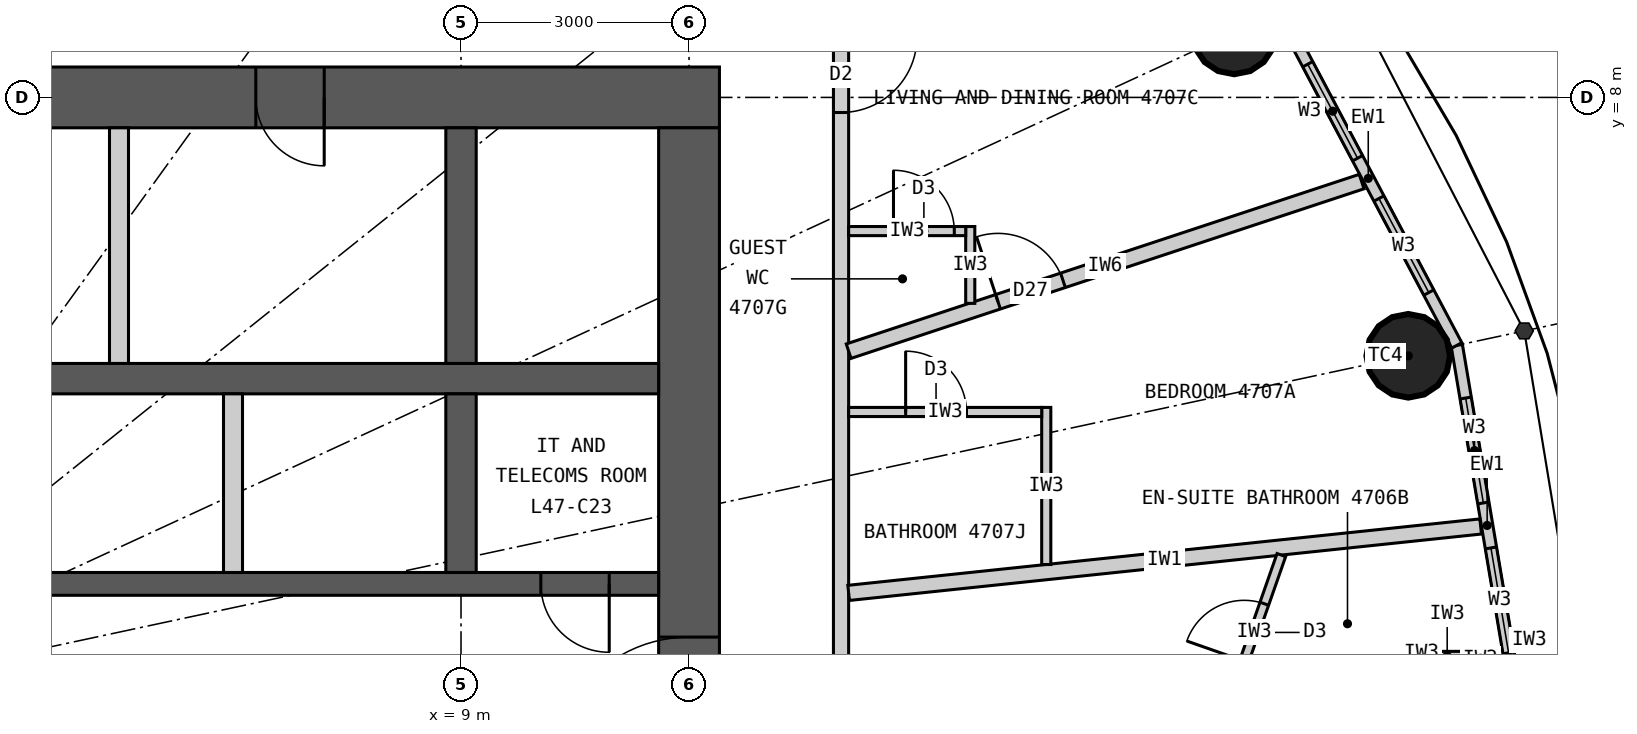
"""IFC4 building model, lengths in metres.
Left out: names, types, materials, properties, quantities, classifications, styles, units other than length and angle.
Written with IfcOpenShell. Run it as: python <this file> out.ifc"""

import sys

from ifc_helpers import new_model, si_unit, direction, frame, frame_2d, origin, origin_2d, place, context, subcontext, project, spatial, rectangle, circle, extrude, element, fill, save


model = new_model("IFC4")
c1 = context("Model", 3, precision=1e-05, world=origin(), true_north=direction((0.0, 1.0)))
c2 = subcontext(c1, "Body", "Model", "MODEL_VIEW")
j1 = project(units=[si_unit("LENGTHUNIT", "METRE"), si_unit("PLANEANGLEUNIT", "RADIAN")], contexts=[c1])
p1 = place(None, origin())
s1 = spatial("IfcSite", under=j1, at=p1, CompositionType="ELEMENT")
p2 = place(p1, origin())
s2 = spatial("IfcBuilding", under=s1, at=p2, CompositionType="ELEMENT")
p3 = place(p2, frame((0.0, 0.0, 176.4)))
s3 = spatial("IfcBuildingStorey", under=s2, at=p3, CompositionType="ELEMENT", Elevation=176.4)
for number, where, z_axis, x_axis in (
    (1, (21.463, 4.601, 0.0), (0.0, 0.0, 1.0), (1.0, 0.0, 0.0)),
    (2, (19.172, 8.855, 0.0), (0.0, 0.0, 1.0), (1.0, 0.0, 0.0)),
):
    element("IfcColumn", number, at=place(p3, frame(where, z_axis=z_axis, x_axis=x_axis)), inside=s3, PredefinedType="COLUMN", context=c2, shape_type="SweptSolid", body=[
        extrude(circle(Radius=0.55, at=origin_2d()), origin(), (0.0, 0.0, 1.0), 3.3),
    ])
p4 = place(p3, frame((-12.4, 8.0, 0.0), z_axis=(0.0, 0.0, 1.0), x_axis=(1.0, 0.0, 0.0)))
e3 = element("IfcWall", 3, at=p4, inside=s3, PredefinedType="SHEAR", context=c2, shape_type="SweptSolid", body=[
    extrude(rectangle(XDim=24.8, YDim=0.8, at=frame_2d((12.4, 0.0))), origin(), (0.0, 0.0, 1.0), 3.3),
])
p5 = place(p4, frame((11.1, 0.0, 0.0)))
e4 = element("IfcOpeningElement", 4, at=p5, cuts=e3, PredefinedType="OPENING", context=c2, shape_type="SweptSolid", body=[
    extrude(rectangle(XDim=1.2, YDim=2.2, at=frame_2d((0.6, 1.1))), frame((0.0, 0.41, 0.0), z_axis=(0.0, -1.0, 0.0), x_axis=(1.0, 0.0, 0.0)), (0.0, 0.0, 1.0), 0.82),
])
p6 = place(p4, frame((18.7, 0.0, 0.0)))
e5 = element("IfcOpeningElement", 5, at=p6, cuts=e3, PredefinedType="OPENING", context=c2, shape_type="SweptSolid", body=[
    extrude(rectangle(XDim=0.9, YDim=2.2, at=frame_2d((0.45, 1.1))), frame((0.0, 0.41, 0.0), z_axis=(0.0, -1.0, 0.0), x_axis=(1.0, 0.0, 0.0)), (0.0, 0.0, 1.0), 0.82),
])
p7 = place(p3, frame((12.0, -7.6, 0.0), z_axis=(0.0, 0.0, 1.0), x_axis=(0.0, 1.0, 0.0)))
e6 = element("IfcWall", 6, at=p7, inside=s3, PredefinedType="SHEAR", context=c2, shape_type="SweptSolid", body=[
    extrude(rectangle(XDim=15.2, YDim=0.8, at=frame_2d((7.6, 0.0))), origin(), (0.0, 0.0, 1.0), 3.3),
])
p8 = place(p7, frame((6.7, 0.0, 0.0)))
e7 = element("IfcOpeningElement", 7, at=p8, cuts=e6, PredefinedType="OPENING", context=c2, shape_type="SweptSolid", body=[
    extrude(rectangle(XDim=1.8, YDim=2.2, at=frame_2d((0.9, 1.1))), frame((0.0, 0.41, 0.0), z_axis=(0.0, -1.0, 0.0), x_axis=(1.0, 0.0, 0.0)), (0.0, 0.0, 1.0), 0.82),
])
p9 = place(p3, frame((-11.6, 4.3, 0.0), z_axis=(0.0, 0.0, 1.0), x_axis=(1.0, 0.0, 0.0)))
e8 = element("IfcWall", 8, at=p9, inside=s3, PredefinedType="SHEAR", context=c2, shape_type="SweptSolid", body=[
    extrude(rectangle(XDim=23.2, YDim=0.4, at=frame_2d((11.6, 0.0))), origin(), (0.0, 0.0, 1.0), 3.3),
])
p10 = place(p3, frame((-11.6, 1.6, 0.0), z_axis=(0.0, 0.0, 1.0), x_axis=(1.0, 0.0, 0.0)))
e9 = element("IfcWall", 9, at=p10, inside=s3, PredefinedType="SHEAR", context=c2, shape_type="SweptSolid", body=[
    extrude(rectangle(XDim=23.2, YDim=0.3, at=frame_2d((11.6, 0.0))), origin(), (0.0, 0.0, 1.0), 3.3),
])
p11 = place(p10, frame((9.55, 0.0, 0.0)))
e10 = element("IfcOpeningElement", 10, at=p11, cuts=e9, PredefinedType="OPENING", context=c2, shape_type="SweptSolid", body=[
    extrude(rectangle(XDim=1.1, YDim=2.2, at=frame_2d((0.55, 1.1))), frame((0.0, 0.16, 0.0), z_axis=(0.0, -1.0, 0.0), x_axis=(1.0, 0.0, 0.0)), (0.0, 0.0, 1.0), 0.32),
])
p12 = place(p10, frame((12.55, 0.0, 0.0)))
e11 = element("IfcOpeningElement", 11, at=p12, cuts=e9, PredefinedType="OPENING", context=c2, shape_type="SweptSolid", body=[
    extrude(rectangle(XDim=1.1, YDim=2.2, at=frame_2d((0.55, 1.1))), frame((0.0, 0.16, 0.0), z_axis=(0.0, -1.0, 0.0), x_axis=(1.0, 0.0, 0.0)), (0.0, 0.0, 1.0), 0.32),
])
p13 = place(p10, frame((0.65, 0.0, 0.0)))
e12 = element("IfcOpeningElement", 12, at=p13, cuts=e9, PredefinedType="OPENING", context=c2, shape_type="SweptSolid", body=[
    extrude(rectangle(XDim=0.9, YDim=2.2, at=frame_2d((0.45, 1.1))), frame((0.0, 0.16, 0.0), z_axis=(0.0, -1.0, 0.0), x_axis=(1.0, 0.0, 0.0)), (0.0, 0.0, 1.0), 0.32),
])
p14 = place(p10, frame((5.15, 0.0, 0.0)))
e13 = element("IfcOpeningElement", 13, at=p14, cuts=e9, PredefinedType="OPENING", context=c2, shape_type="SweptSolid", body=[
    extrude(rectangle(XDim=0.9, YDim=2.2, at=frame_2d((0.45, 1.1))), frame((0.0, 0.16, 0.0), z_axis=(0.0, -1.0, 0.0), x_axis=(1.0, 0.0, 0.0)), (0.0, 0.0, 1.0), 0.32),
])
p15 = place(p10, frame((21.65, 0.0, 0.0)))
e14 = element("IfcOpeningElement", 14, at=p15, cuts=e9, PredefinedType="OPENING", context=c2, shape_type="SweptSolid", body=[
    extrude(rectangle(XDim=0.9, YDim=2.2, at=frame_2d((0.45, 1.1))), frame((0.0, 0.16, 0.0), z_axis=(0.0, -1.0, 0.0), x_axis=(1.0, 0.0, 0.0)), (0.0, 0.0, 1.0), 0.32),
])
p16 = place(p3, frame((9.0, 4.5, 0.0), z_axis=(0.0, 0.0, 1.0), x_axis=(0.0, 1.0, 0.0)))
e15 = element("IfcWall", 15, at=p16, inside=s3, PredefinedType="SHEAR", context=c2, shape_type="SweptSolid", body=[
    extrude(rectangle(XDim=3.1, YDim=0.4, at=frame_2d((1.55, 0.0))), origin(), (0.0, 0.0, 1.0), 3.3),
])
p17 = place(p3, frame((9.0, 1.75, 0.0), z_axis=(0.0, 0.0, 1.0), x_axis=(0.0, 1.0, 0.0)))
e16 = element("IfcWall", 16, at=p17, inside=s3, PredefinedType="SHEAR", context=c2, shape_type="SweptSolid", body=[
    extrude(rectangle(XDim=2.35, YDim=0.4, at=frame_2d((1.175, 0.0))), origin(), (0.0, 0.0, 1.0), 3.3),
])
p18 = place(p3, frame((4.5, 4.5, 0.0), z_axis=(0.0, 0.0, 1.0), x_axis=(0.0, 1.0, 0.0)))
e17 = element("IfcWall", 17, at=p18, inside=s3, PredefinedType="PARTITIONING", context=c2, shape_type="SweptSolid", body=[
    extrude(rectangle(XDim=3.1, YDim=0.25, at=frame_2d((1.55, 0.0))), origin(), (0.0, 0.0, 1.0), 3.3),
])
p19 = place(p3, frame((6.0, 1.75, 0.0), z_axis=(0.0, 0.0, 1.0), x_axis=(0.0, 1.0, 0.0)))
e18 = element("IfcWall", 18, at=p19, inside=s3, PredefinedType="PARTITIONING", context=c2, shape_type="SweptSolid", body=[
    extrude(rectangle(XDim=2.35, YDim=0.25, at=frame_2d((1.175, 0.0))), origin(), (0.0, 0.0, 1.0), 3.3),
])
p20 = place(p3, frame((22.9, 0.0, 0.0), z_axis=(0.0, 0.0, 1.0), x_axis=(-0.166162111254, 0.986098449843, 0.0)))
e19 = element("IfcWall", 19, at=p20, inside=s3, PredefinedType="ELEMENTEDWALL", context=c2, shape_type="SweptSolid", body=[
    extrude(rectangle(XDim=4.805, YDim=0.15, at=frame_2d((2.402, 0.0))), origin(), (0.0, 0.0, 1.0), 3.12),
])
p21 = place(p20, frame((0.702, 0.0, 0.9)))
e20 = element("IfcOpeningElement", 20, at=p21, cuts=e19, PredefinedType="OPENING", context=c2, shape_type="SweptSolid", body=[
    extrude(rectangle(XDim=1.4, YDim=1.9, at=frame_2d((0.7, 0.95))), frame((0.0, 0.085, 0.0), z_axis=(0.0, -1.0, 0.0), x_axis=(1.0, 0.0, 0.0)), (0.0, 0.0, 1.0), 0.17),
])
p22 = place(p20, frame((2.702, 0.0, 0.9)))
e21 = element("IfcOpeningElement", 21, at=p22, cuts=e19, PredefinedType="OPENING", context=c2, shape_type="SweptSolid", body=[
    extrude(rectangle(XDim=1.4, YDim=1.9, at=frame_2d((0.7, 0.95))), frame((0.0, 0.085, 0.0), z_axis=(0.0, -1.0, 0.0), x_axis=(1.0, 0.0, 0.0)), (0.0, 0.0, 1.0), 0.17),
])
p23 = place(p3, frame((22.102, 4.738, 0.0), z_axis=(0.0, 0.0, 1.0), x_axis=(-0.468428906714, 0.883501193748, 0.0)))
e22 = element("IfcWall", 22, at=p23, inside=s3, PredefinedType="ELEMENTEDWALL", context=c2, shape_type="SweptSolid", body=[
    extrude(rectangle(XDim=4.974, YDim=0.15, at=frame_2d((2.487, 0.0))), origin(), (0.0, 0.0, 1.0), 3.12),
])
p24 = place(p23, frame((0.787, 0.0, 0.9)))
e23 = element("IfcOpeningElement", 23, at=p24, cuts=e22, PredefinedType="OPENING", context=c2, shape_type="SweptSolid", body=[
    extrude(rectangle(XDim=1.4, YDim=1.9, at=frame_2d((0.7, 0.95))), frame((0.0, 0.085, 0.0), z_axis=(0.0, -1.0, 0.0), x_axis=(1.0, 0.0, 0.0)), (0.0, 0.0, 1.0), 0.17),
])
p25 = place(p23, frame((2.787, 0.0, 0.9)))
e24 = element("IfcOpeningElement", 24, at=p25, cuts=e22, PredefinedType="OPENING", context=c2, shape_type="SweptSolid", body=[
    extrude(rectangle(XDim=1.4, YDim=1.9, at=frame_2d((0.7, 0.95))), frame((0.0, 0.085, 0.0), z_axis=(0.0, -1.0, 0.0), x_axis=(1.0, 0.0, 0.0)), (0.0, 0.0, 1.0), 0.17),
])
p26 = place(p3, frame((14.0, -9.9, 0.0), z_axis=(0.0, 0.0, 1.0), x_axis=(0.0, 1.0, 0.0)))
e25 = element("IfcWall", 25, at=p26, inside=s3, PredefinedType="PARTITIONING", context=c2, shape_type="SweptSolid", body=[
    extrude(rectangle(XDim=19.8, YDim=0.2, at=frame_2d((9.9, 0.0))), origin(), (0.0, 0.0, 1.0), 3.12),
])
p27 = place(p26, frame((4.268, 0.0, 0.0)))
e26 = element("IfcOpeningElement", 26, at=p27, cuts=e25, PredefinedType="OPENING", context=c2, shape_type="SweptSolid", body=[
    extrude(rectangle(XDim=1.0, YDim=2.2, at=frame_2d((0.5, 1.1))), frame((0.0, 0.11, 0.0), z_axis=(0.0, -1.0, 0.0), x_axis=(1.0, 0.0, 0.0)), (0.0, 0.0, 1.0), 0.22),
])
p28 = place(p26, frame((7.177, 0.0, 0.0)))
e27 = element("IfcOpeningElement", 27, at=p28, cuts=e25, PredefinedType="OPENING", context=c2, shape_type="SweptSolid", body=[
    extrude(rectangle(XDim=1.0, YDim=2.2, at=frame_2d((0.5, 1.1))), frame((0.0, 0.11, 0.0), z_axis=(0.0, -1.0, 0.0), x_axis=(1.0, 0.0, 0.0)), (0.0, 0.0, 1.0), 0.22),
])
p29 = place(p26, frame((17.701, 0.0, 0.0)))
e28 = element("IfcOpeningElement", 28, at=p29, cuts=e25, PredefinedType="OPENING", context=c2, shape_type="SweptSolid", body=[
    extrude(rectangle(XDim=1.0, YDim=2.2, at=frame_2d((0.5, 1.1))), frame((0.0, 0.11, 0.0), z_axis=(0.0, -1.0, 0.0), x_axis=(1.0, 0.0, 0.0)), (0.0, 0.0, 1.0), 0.22),
])
p30 = place(p3, frame((14.1, 1.481, 0.0), z_axis=(0.0, 0.0, 1.0), x_axis=(0.994524794819, 0.104500873159, 0.0)))
e29 = element("IfcWall", 29, at=p30, inside=s3, PredefinedType="PARTITIONING", context=c2, shape_type="SweptSolid", body=[
    extrude(rectangle(XDim=8.362, YDim=0.2, at=frame_2d((4.181, 0.0))), origin(), (0.0, 0.0, 1.0), 2.47),
])
p31 = place(p3, frame((14.1, 4.661, 0.0), z_axis=(0.0, 0.0, 1.0), x_axis=(0.949453216399, 0.313908569285, 0.0)))
e30 = element("IfcWall", 30, at=p31, inside=s3, PredefinedType="PARTITIONING", context=c2, shape_type="SweptSolid", body=[
    extrude(rectangle(XDim=7.109, YDim=0.2, at=frame_2d((3.554, 0.0))), origin(), (0.0, 0.0, 1.0), 3.12),
])
p32 = place(p31, frame((2.07, 0.0, 0.0)))
e31 = element("IfcOpeningElement", 31, at=p32, cuts=e30, PredefinedType="OPENING", context=c2, shape_type="SweptSolid", body=[
    extrude(rectangle(XDim=0.9, YDim=2.1, at=frame_2d((0.45, 1.05))), frame((0.0, 0.11, 0.0), z_axis=(0.0, -1.0, 0.0), x_axis=(1.0, 0.0, 0.0)), (0.0, 0.0, 1.0), 0.22),
])
p33 = place(p3, frame((19.793, 1.979, 0.0), z_axis=(0.0, 0.0, 1.0), x_axis=(-0.330587353123, -0.943775398045, 0.0)))
e32 = element("IfcWall", 32, at=p33, inside=s3, PredefinedType="PARTITIONING", context=c2, shape_type="SweptSolid", body=[
    extrude(rectangle(XDim=2.157, YDim=0.12, at=frame_2d((1.079, 0.0))), origin(), (0.0, 0.0, 1.0), 3.12),
])
p34 = place(p33, frame((0.678, 0.0, 0.0)))
e33 = element("IfcOpeningElement", 33, at=p34, cuts=e32, PredefinedType="OPENING", context=c2, shape_type="SweptSolid", body=[
    extrude(rectangle(XDim=0.8, YDim=2.1, at=frame_2d((0.4, 1.05))), frame((0.0, 0.07, 0.0), z_axis=(0.0, -1.0, 0.0), x_axis=(1.0, 0.0, 0.0)), (0.0, 0.0, 1.0), 0.14),
])
p35 = place(p3, frame((21.64, 0.06, 0.0), z_axis=(0.0, 0.0, 1.0), x_axis=(0.0, 1.0, 0.0)))
e34 = element("IfcWall", 34, at=p35, inside=s3, PredefinedType="PARTITIONING", context=c2, shape_type="SweptSolid", body=[
    extrude(rectangle(XDim=0.652, YDim=0.12, at=frame_2d((0.326, 0.0))), origin(), (0.0, 0.0, 1.0), 3.12),
])
p36 = place(p3, frame((21.7, 0.652, 0.0), z_axis=(0.0, 0.0, 1.0), x_axis=(1.0, 0.0, 0.0)))
e35 = element("IfcWall", 35, at=p36, inside=s3, PredefinedType="PARTITIONING", context=c2, shape_type="SweptSolid", body=[
    extrude(rectangle(XDim=0.55, YDim=0.12, at=frame_2d((0.275, 0.0))), origin(), (0.0, 0.0, 1.0), 3.12),
])
p37 = place(p3, frame((22.25, 0.652, 0.0), z_axis=(0.0, 0.0, 1.0), x_axis=(0.965922233104, -0.258832454679, 0.0)))
e36 = element("IfcWall", 36, at=p37, inside=s3, PredefinedType="PARTITIONING", context=c2, shape_type="SweptSolid", body=[
    extrude(rectangle(XDim=0.338, YDim=0.12, at=frame_2d((0.169, 0.0))), origin(), (0.0, 0.0, 1.0), 3.12),
])
p38 = place(p3, frame((16.7, 1.855, 0.0), z_axis=(0.0, 0.0, 1.0), x_axis=(0.0, 1.0, 0.0)))
e37 = element("IfcWall", 37, at=p38, inside=s3, PredefinedType="PARTITIONING", context=c2, shape_type="SweptSolid", body=[
    extrude(rectangle(XDim=2.067, YDim=0.12, at=frame_2d((1.033, 0.0))), origin(), (0.0, 0.0, 1.0), 3.12),
])
p39 = place(p3, frame((14.1, 3.862, 0.0), z_axis=(0.0, 0.0, 1.0), x_axis=(1.0, 0.0, 0.0)))
e38 = element("IfcWall", 38, at=p39, inside=s3, PredefinedType="PARTITIONING", context=c2, shape_type="SweptSolid", body=[
    extrude(rectangle(XDim=2.54, YDim=0.12, at=frame_2d((1.27, 0.0))), origin(), (0.0, 0.0, 1.0), 2.42),
])
p40 = place(p39, frame((0.75, 0.0, 0.0)))
e39 = element("IfcOpeningElement", 39, at=p40, cuts=e38, PredefinedType="OPENING", context=c2, shape_type="SweptSolid", body=[
    extrude(rectangle(XDim=0.8, YDim=2.1, at=frame_2d((0.4, 1.05))), frame((0.0, 0.07, 0.0), z_axis=(0.0, -1.0, 0.0), x_axis=(1.0, 0.0, 0.0)), (0.0, 0.0, 1.0), 0.14),
])
p41 = place(p3, frame((15.7, 5.291, 0.0), z_axis=(0.0, 0.0, 1.0), x_axis=(0.0, 1.0, 0.0)))
e40 = element("IfcWall", 40, at=p41, inside=s3, PredefinedType="PARTITIONING", context=c2, shape_type="SweptSolid", body=[
    extrude(rectangle(XDim=1.011, YDim=0.12, at=frame_2d((0.505, 0.0))), origin(), (0.0, 0.0, 1.0), 3.12),
])
p42 = place(p3, frame((14.1, 6.241, 0.0), z_axis=(0.0, 0.0, 1.0), x_axis=(1.0, 0.0, 0.0)))
e41 = element("IfcWall", 41, at=p42, inside=s3, PredefinedType="PARTITIONING", context=c2, shape_type="SweptSolid", body=[
    extrude(rectangle(XDim=1.54, YDim=0.12, at=frame_2d((0.77, 0.0))), origin(), (0.0, 0.0, 1.0), 3.12),
])
p43 = place(p42, frame((0.59, 0.0, 0.0)))
e42 = element("IfcOpeningElement", 42, at=p43, cuts=e41, PredefinedType="OPENING", context=c2, shape_type="SweptSolid", body=[
    extrude(rectangle(XDim=0.8, YDim=2.1, at=frame_2d((0.4, 1.05))), frame((0.0, 0.07, 0.0), z_axis=(0.0, -1.0, 0.0), x_axis=(1.0, 0.0, 0.0)), (0.0, 0.0, 1.0), 0.14),
])
p44 = place(p21, origin())
e43 = element("IfcWindow", 43, at=p44, inside=s3, PartitioningType="SINGLE_PANEL", PredefinedType="WINDOW", context=c2, shape_type="SweptSolid", body=[
    extrude(rectangle(XDim=1.4, YDim=1.9, at=frame_2d((0.7, 0.95))), frame((0.0, 0.03, 0.0), z_axis=(0.0, -1.0, 0.0), x_axis=(1.0, 0.0, 0.0)), (0.0, 0.0, 1.0), 0.06),
])
fill(e20, e43)
p45 = place(p22, origin())
e44 = element("IfcWindow", 44, at=p45, inside=s3, PartitioningType="SINGLE_PANEL", PredefinedType="WINDOW", context=c2, shape_type="SweptSolid", body=[
    extrude(rectangle(XDim=1.4, YDim=1.9, at=frame_2d((0.7, 0.95))), frame((0.0, 0.03, 0.0), z_axis=(0.0, -1.0, 0.0), x_axis=(1.0, 0.0, 0.0)), (0.0, 0.0, 1.0), 0.06),
])
fill(e21, e44)
p46 = place(p24, origin())
e45 = element("IfcWindow", 45, at=p46, inside=s3, PartitioningType="SINGLE_PANEL", PredefinedType="WINDOW", context=c2, shape_type="SweptSolid", body=[
    extrude(rectangle(XDim=1.4, YDim=1.9, at=frame_2d((0.7, 0.95))), frame((0.0, 0.03, 0.0), z_axis=(0.0, -1.0, 0.0), x_axis=(1.0, 0.0, 0.0)), (0.0, 0.0, 1.0), 0.06),
])
fill(e23, e45)
p47 = place(p25, origin())
e46 = element("IfcWindow", 46, at=p47, inside=s3, PartitioningType="SINGLE_PANEL", PredefinedType="WINDOW", context=c2, shape_type="SweptSolid", body=[
    extrude(rectangle(XDim=1.4, YDim=1.9, at=frame_2d((0.7, 0.95))), frame((0.0, 0.03, 0.0), z_axis=(0.0, -1.0, 0.0), x_axis=(1.0, 0.0, 0.0)), (0.0, 0.0, 1.0), 0.06),
])
fill(e24, e46)
p48 = place(p34, origin())
e47 = element("IfcDoor", 47, at=p48, inside=s3, OperationType="SINGLE_SWING_RIGHT", PredefinedType="DOOR", context=c2, shape_type="SweptSolid", body=[
    extrude(rectangle(XDim=0.8, YDim=2.1, at=frame_2d((0.4, 1.05))), frame((0.0, 0.025, 0.0), z_axis=(0.0, -1.0, 0.0), x_axis=(1.0, 0.0, 0.0)), (0.0, 0.0, 1.0), 0.05),
])
fill(e33, e47)
p49 = place(p40, origin())
e48 = element("IfcDoor", 48, at=p49, inside=s3, OperationType="SINGLE_SWING_LEFT", PredefinedType="DOOR", context=c2, shape_type="SweptSolid", body=[
    extrude(rectangle(XDim=0.8, YDim=2.1, at=frame_2d((0.4, 1.05))), frame((0.0, 0.025, 0.0), z_axis=(0.0, -1.0, 0.0), x_axis=(1.0, 0.0, 0.0)), (0.0, 0.0, 1.0), 0.05),
])
fill(e39, e48)
p50 = place(p43, origin())
e49 = element("IfcDoor", 49, at=p50, inside=s3, OperationType="SINGLE_SWING_LEFT", PredefinedType="DOOR", context=c2, shape_type="SweptSolid", body=[
    extrude(rectangle(XDim=0.8, YDim=2.1, at=frame_2d((0.4, 1.05))), frame((0.0, 0.025, 0.0), z_axis=(0.0, -1.0, 0.0), x_axis=(1.0, 0.0, 0.0)), (0.0, 0.0, 1.0), 0.05),
])
fill(e42, e49)
p51 = place(p29, origin())
e50 = element("IfcDoor", 50, at=p51, inside=s3, OperationType="SINGLE_SWING_RIGHT", PredefinedType="DOOR", context=c2, shape_type="SweptSolid", body=[
    extrude(rectangle(XDim=1.0, YDim=2.2, at=frame_2d((0.5, 1.1))), frame((0.0, 0.025, 0.0), z_axis=(0.0, -1.0, 0.0), x_axis=(1.0, 0.0, 0.0)), (0.0, 0.0, 1.0), 0.05),
])
fill(e28, e50)
p52 = place(p32, origin())
e51 = element("IfcDoor", 51, at=p52, inside=s3, OperationType="SINGLE_SWING_LEFT", PredefinedType="DOOR", context=c2, shape_type="SweptSolid", body=[
    extrude(rectangle(XDim=0.9, YDim=2.1, at=frame_2d((0.45, 1.05))), frame((0.0, 0.025, 0.0), z_axis=(0.0, -1.0, 0.0), x_axis=(1.0, 0.0, 0.0)), (0.0, 0.0, 1.0), 0.05),
])
fill(e31, e51)
p53 = place(p6, origin())
e52 = element("IfcDoor", 52, at=p53, inside=s3, OperationType="SINGLE_SWING_RIGHT", PredefinedType="DOOR", context=c2, shape_type="SweptSolid", body=[
    extrude(rectangle(XDim=0.9, YDim=2.2, at=frame_2d((0.45, 1.1))), frame((0.0, 0.025, 0.0), z_axis=(0.0, -1.0, 0.0), x_axis=(1.0, 0.0, 0.0)), (0.0, 0.0, 1.0), 0.05),
])
fill(e5, e52)
p54 = place(p15, origin())
e53 = element("IfcDoor", 53, at=p54, inside=s3, OperationType="SINGLE_SWING_RIGHT", PredefinedType="DOOR", context=c2, shape_type="SweptSolid", body=[
    extrude(rectangle(XDim=0.9, YDim=2.2, at=frame_2d((0.45, 1.1))), frame((0.0, 0.025, 0.0), z_axis=(0.0, -1.0, 0.0), x_axis=(1.0, 0.0, 0.0)), (0.0, 0.0, 1.0), 0.05),
])
fill(e14, e53)
p55 = place(p8, origin())
e54 = element("IfcDoor", 54, at=p55, inside=s3, OperationType="DOUBLE_DOOR_DOUBLE_SWING", PredefinedType="DOOR", context=c2, shape_type="SweptSolid", body=[
    extrude(rectangle(XDim=1.8, YDim=2.2, at=frame_2d((0.9, 1.1))), frame((0.0, 0.025, 0.0), z_axis=(0.0, -1.0, 0.0), x_axis=(1.0, 0.0, 0.0)), (0.0, 0.0, 1.0), 0.05),
])
fill(e7, e54)
save(model, sys.argv[1])
